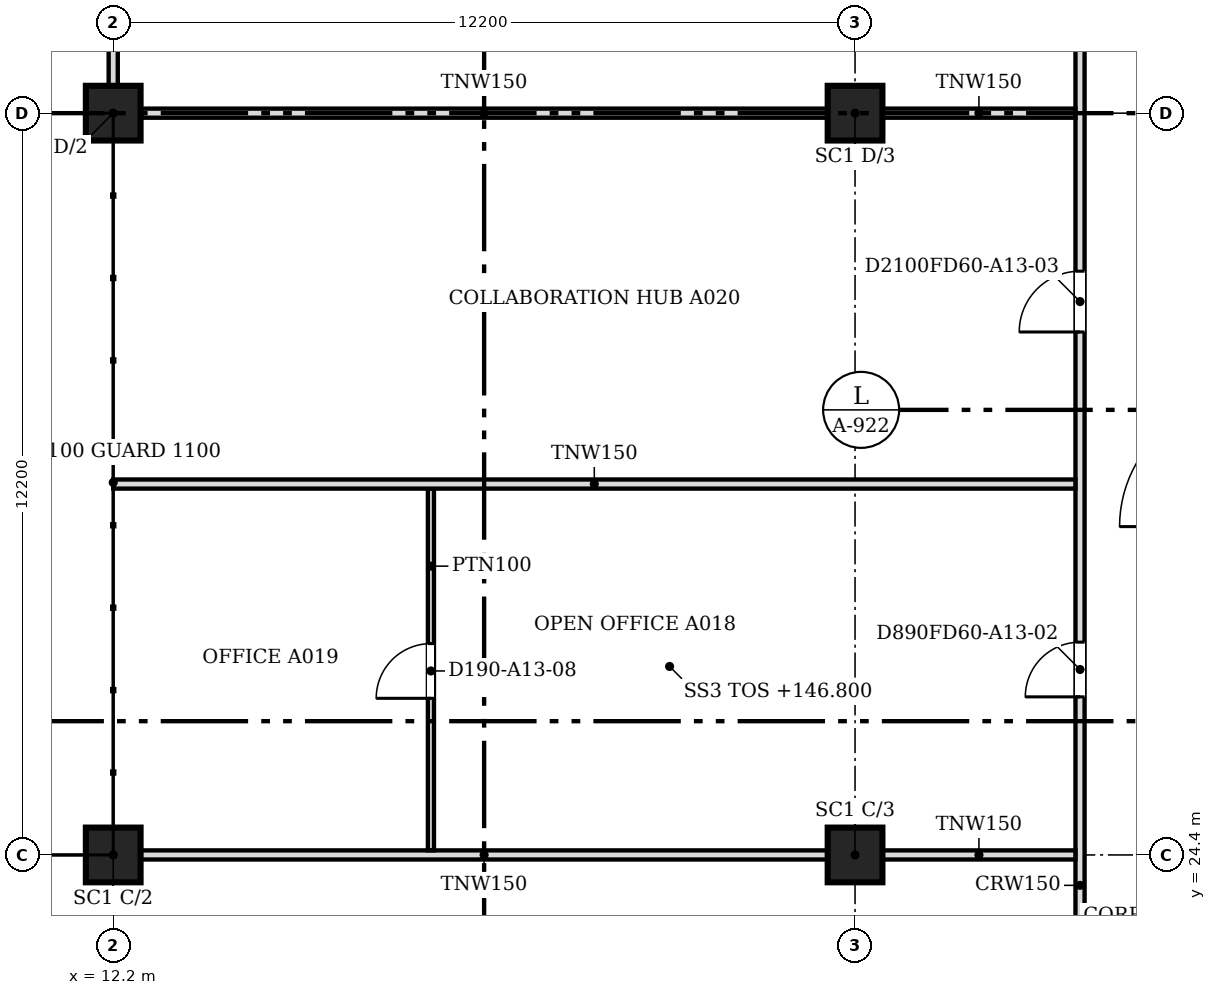
"""IFC4 building model, lengths in metres.
Left out: names, types, materials, properties, quantities, classifications, styles, units other than length and angle.
Written with IfcOpenShell. Run it as: python <this file> out.ifc"""

import sys

from ifc_helpers import new_model, si_unit, direction, frame, frame_2d, origin, origin_2d, place, context, subcontext, project, spatial, rectangle, extrude, source, transform, mapped, element, fill, save


model = new_model("IFC4")
c1 = context("Model", 3, precision=1e-05, world=origin(), true_north=direction((0.0, 1.0)))
c2 = subcontext(c1, "Body", "Model", "MODEL_VIEW")
j1 = project(units=[si_unit("LENGTHUNIT", "METRE"), si_unit("PLANEANGLEUNIT", "RADIAN")], contexts=[c1])
p1 = place(None, origin())
s1 = spatial("IfcSite", under=j1, at=p1, CompositionType="ELEMENT")
p2 = place(p1, origin())
s2 = spatial("IfcBuilding", under=s1, at=p2, CompositionType="ELEMENT")
p3 = place(p2, frame((0.0, 0.0, 146.8)))
s3 = spatial("IfcBuildingStorey", under=s2, at=p3, CompositionType="ELEMENT", Elevation=146.8)
for number, where, z_axis, x_axis in (
    (1, (12.2, 24.4, 0.0), (0.0, 0.0, 1.0), (1.0, 0.0, 0.0)),
    (2, (12.2, 36.6, 0.0), (0.0, 0.0, 1.0), (1.0, 0.0, 0.0)),
    (3, (24.4, 24.4, 0.0), (0.0, 0.0, 1.0), (1.0, 0.0, 0.0)),
    (4, (24.4, 36.6, 0.0), (0.0, 0.0, 1.0), (1.0, 0.0, 0.0)),
):
    element("IfcColumn", number, at=place(p3, frame(where, z_axis=z_axis, x_axis=x_axis)), inside=s3, PredefinedType="COLUMN", context=c2, shape_type="SweptSolid", body=[
        extrude(rectangle(XDim=0.9, YDim=0.9, at=origin_2d()), origin(), (0.0, 0.0, 1.0), 3.5),
    ])
p4 = place(p3, frame((28.1, 18.8, 0.0), z_axis=(0.0, 0.0, 1.0), x_axis=(0.0, 1.0, 0.0)))
e5 = element("IfcWall", 5, at=p4, inside=s3, PredefinedType="PARTITIONING", context=c2, shape_type="SweptSolid", body=[
    extrude(rectangle(XDim=26.024, YDim=0.15, at=frame_2d((13.012, 0.0))), origin(), (0.0, 0.0, 1.0), 2.888),
])
m1 = source(origin(), c2, "Body", "SweptSolid", [
    extrude(rectangle(XDim=0.9, YDim=2.1, at=frame_2d((0.45, 1.05))), frame((0.0, 0.085, 0.0), z_axis=(0.0, -1.0, 0.0), x_axis=(1.0, 0.0, 0.0)), (0.0, 0.0, 1.0), 0.17),
])
p5 = place(p4, frame((1.1, 0.0, 0.0)))
e6 = element("IfcOpeningElement", 6, at=p5, cuts=e5, PredefinedType="OPENING", context=c2, shape_type="MappedRepresentation", body=[
    mapped(m1, transform((0.0, 0.0, 0.0), scale=1.0)),
])
m2 = source(origin(), c2, "Body", "SweptSolid", [
    extrude(rectangle(XDim=1.0, YDim=2.1, at=frame_2d((0.5, 1.05))), frame((0.0, 0.085, 0.0), z_axis=(0.0, -1.0, 0.0), x_axis=(1.0, 0.0, 0.0)), (0.0, 0.0, 1.0), 0.17),
])
p6 = place(p4, frame((14.201, 0.0, 0.0)))
e7 = element("IfcOpeningElement", 7, at=p6, cuts=e5, PredefinedType="OPENING", context=c2, shape_type="MappedRepresentation", body=[
    mapped(m2, transform((0.0, 0.0, 0.0), scale=1.0)),
])
p7 = place(p4, frame((8.2, 0.0, 0.0)))
e8 = element("IfcOpeningElement", 8, at=p7, cuts=e5, PredefinedType="OPENING", context=c2, shape_type="MappedRepresentation", body=[
    mapped(m1, transform((0.0, 0.0, 0.0), scale=1.0)),
])
p8 = place(p4, frame((21.4, 0.0, 0.0)))
e9 = element("IfcOpeningElement", 9, at=p8, cuts=e5, PredefinedType="OPENING", context=c2, shape_type="MappedRepresentation", body=[
    mapped(m2, transform((0.0, 0.0, 0.0), scale=1.0)),
])
p9 = place(p3, frame((12.651, 24.4, 0.0), z_axis=(0.0, 0.0, 1.0), x_axis=(1.0, 0.0, 0.0)))
e10 = element("IfcWall", 10, at=p9, inside=s3, PredefinedType="PARTITIONING", context=c2, shape_type="SweptSolid", body=[
    extrude(rectangle(XDim=11.298, YDim=0.15, at=frame_2d((5.649, 0.0))), origin(), (0.0, 0.0, 1.0), 2.888),
])
p10 = place(p3, frame((24.851, 24.4, 0.0), z_axis=(0.0, 0.0, 1.0), x_axis=(1.0, 0.0, 0.0)))
e11 = element("IfcWall", 11, at=p10, inside=s3, PredefinedType="PARTITIONING", context=c2, shape_type="SweptSolid", body=[
    extrude(rectangle(XDim=3.173, YDim=0.15, at=frame_2d((1.586, 0.0))), origin(), (0.0, 0.0, 1.0), 2.888),
])
p11 = place(p3, frame((17.425, 24.476, 0.0), z_axis=(0.0, 0.0, 1.0), x_axis=(0.0, 1.0, 0.0)))
e12 = element("IfcWall", 12, at=p11, inside=s3, PredefinedType="PARTITIONING", context=c2, shape_type="SweptSolid", body=[
    extrude(rectangle(XDim=5.948, YDim=0.1, at=frame_2d((2.974, 0.0))), origin(), (0.0, 0.0, 1.0), 2.888),
])
m3 = source(origin(), c2, "Body", "SweptSolid", [
    extrude(rectangle(XDim=0.9, YDim=2.1, at=frame_2d((0.45, 1.05))), frame((0.0, 0.06, 0.0), z_axis=(0.0, -1.0, 0.0), x_axis=(1.0, 0.0, 0.0)), (0.0, 0.0, 1.0), 0.12),
])
p12 = place(p11, frame((2.5, 0.0, 0.0)))
e13 = element("IfcOpeningElement", 13, at=p12, cuts=e12, PredefinedType="OPENING", context=c2, shape_type="MappedRepresentation", body=[
    mapped(m3, transform((0.0, 0.0, 0.0), scale=1.0)),
])
p13 = place(p3, frame((12.2, 30.5, 0.0), z_axis=(0.0, 0.0, 1.0), x_axis=(1.0, 0.0, 0.0)))
e14 = element("IfcWall", 14, at=p13, inside=s3, PredefinedType="PARTITIONING", context=c2, shape_type="SweptSolid", body=[
    extrude(rectangle(XDim=15.824, YDim=0.15, at=frame_2d((7.912, 0.0))), origin(), (0.0, 0.0, 1.0), 2.888),
])
p14 = place(p3, frame((12.651, 36.6, 0.0), z_axis=(0.0, 0.0, 1.0), x_axis=(1.0, 0.0, 0.0)))
e15 = element("IfcWall", 15, at=p14, inside=s3, PredefinedType="PARTITIONING", context=c2, shape_type="SweptSolid", body=[
    extrude(rectangle(XDim=11.298, YDim=0.15, at=frame_2d((5.649, 0.0))), origin(), (0.0, 0.0, 1.0), 2.888),
])
p15 = place(p3, frame((24.851, 36.6, 0.0), z_axis=(0.0, 0.0, 1.0), x_axis=(1.0, 0.0, 0.0)))
e16 = element("IfcWall", 16, at=p15, inside=s3, PredefinedType="PARTITIONING", context=c2, shape_type="SweptSolid", body=[
    extrude(rectangle(XDim=3.173, YDim=0.15, at=frame_2d((1.586, 0.0))), origin(), (0.0, 0.0, 1.0), 2.888),
])
p16 = place(p3, frame((12.2, 37.051, 0.0), z_axis=(0.0, 0.0, 1.0), x_axis=(0.0, 1.0, 0.0)))
e17 = element("IfcWall", 17, at=p16, inside=s3, PredefinedType="PARTITIONING", context=c2, shape_type="SweptSolid", body=[
    extrude(rectangle(XDim=3.598, YDim=0.15, at=frame_2d((1.799, 0.0))), origin(), (0.0, 0.0, 1.0), 2.888),
])
m4 = source(origin(), c2, "Body", "SweptSolid", [
    extrude(rectangle(XDim=0.9, YDim=2.1, at=frame_2d((0.45, 1.05))), frame((0.0, 0.025, 0.0), z_axis=(0.0, -1.0, 0.0), x_axis=(1.0, 0.0, 0.0)), (0.0, 0.0, 1.0), 0.05),
])
p17 = place(p12, origin())
e18 = element("IfcDoor", 18, at=p17, inside=s3, OperationType="SINGLE_SWING_LEFT", PredefinedType="DOOR", context=c2, shape_type="MappedRepresentation", body=[
    mapped(m4, transform((0.0, 0.0, 0.0), scale=1.0)),
])
fill(e13, e18)
m5 = source(origin(), c2, "Body", "SweptSolid", [
    extrude(rectangle(XDim=1.0, YDim=2.1, at=frame_2d((0.5, 1.05))), frame((0.0, 0.025, 0.0), z_axis=(0.0, -1.0, 0.0), x_axis=(1.0, 0.0, 0.0)), (0.0, 0.0, 1.0), 0.05),
])
p18 = place(p6, origin())
e19 = element("IfcDoor", 19, at=p18, inside=s3, OperationType="SINGLE_SWING_LEFT", PredefinedType="DOOR", context=c2, shape_type="MappedRepresentation", body=[
    mapped(m5, transform((0.0, 0.0, 0.0), scale=1.0)),
])
fill(e7, e19)
p19 = place(p7, origin())
e20 = element("IfcDoor", 20, at=p19, inside=s3, OperationType="SINGLE_SWING_LEFT", PredefinedType="DOOR", context=c2, shape_type="MappedRepresentation", body=[
    mapped(m4, transform((0.0, 0.0, 0.0), scale=1.0)),
])
fill(e8, e20)
save(model, sys.argv[1])
